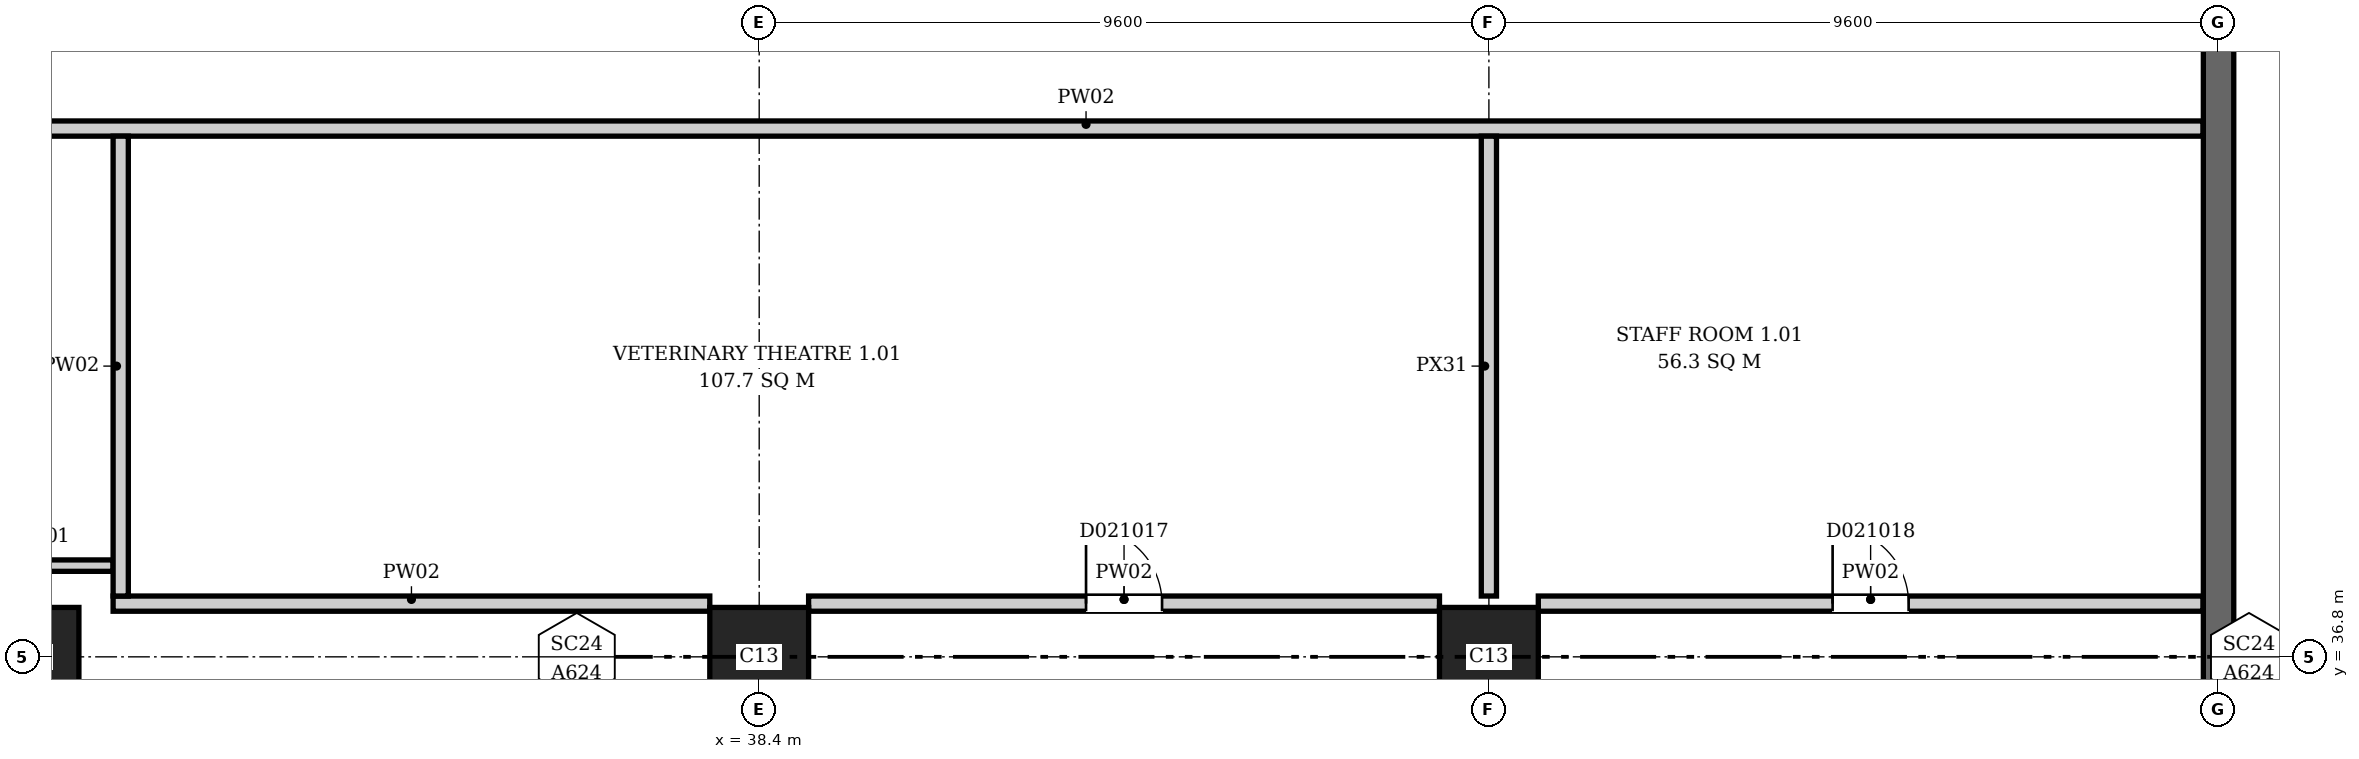
"""IFC4 building model, lengths in metres.
Left out: names, types, materials, properties, quantities, classifications, styles, units other than length and angle.
Written with IfcOpenShell. Run it as: python <this file> out.ifc"""

import sys

from ifc_helpers import new_model, si_unit, direction, frame, frame_2d, origin, origin_2d, place, context, subcontext, project, spatial, rectangle, extrude, element, fill, save


model = new_model("IFC4")
c1 = context("Model", 3, precision=1e-05, world=origin(), true_north=direction((0.0, 1.0)))
c2 = subcontext(c1, "Body", "Model", "MODEL_VIEW")
j1 = project(units=[si_unit("LENGTHUNIT", "METRE"), si_unit("PLANEANGLEUNIT", "RADIAN")], contexts=[c1])
p1 = place(None, origin())
s1 = spatial("IfcSite", under=j1, at=p1, CompositionType="ELEMENT")
p2 = place(p1, origin())
s2 = spatial("IfcBuilding", under=s1, at=p2, CompositionType="ELEMENT")
p3 = place(p2, frame((0.0, 0.0, 6.5)))
s3 = spatial("IfcBuildingStorey", under=s2, at=p3, CompositionType="ELEMENT", Elevation=6.5)
p4 = place(p3, frame((57.6, -0.2, 0.0), z_axis=(0.0, 0.0, 1.0), x_axis=(0.0, 1.0, 0.0)))
e1 = element("IfcWall", 1, at=p4, inside=s3, PredefinedType="SHEAR", context=c2, shape_type="SweptSolid", body=[
    extrude(rectangle(XDim=46.88, YDim=0.4, at=frame_2d((23.44, 0.0))), origin(), (0.0, 0.0, 1.0), 7.7),
])
for number, where, z_axis, x_axis in (
    (2, (28.8, 36.8, 0.0), (0.0, 0.0, 1.0), (1.0, 0.0, 0.0)),
    (3, (38.4, 36.8, 0.0), (0.0, 0.0, 1.0), (1.0, 0.0, 0.0)),
    (4, (48.0, 36.8, 0.0), (0.0, 0.0, 1.0), (1.0, 0.0, 0.0)),
):
    element("IfcColumn", number, at=place(p3, frame(where, z_axis=z_axis, x_axis=x_axis)), inside=s3, PredefinedType="COLUMN", context=c2, shape_type="SweptSolid", body=[
        extrude(rectangle(XDim=1.3, YDim=1.3, at=origin_2d()), origin(), (0.0, 0.0, 1.0), 7.7),
    ])
p5 = place(p3, frame((28.006, 38.0, 0.0), z_axis=(0.0, 0.0, 1.0), x_axis=(1.0, 0.0, 0.0)))
e5 = element("IfcWall", 5, at=p5, inside=s3, PredefinedType="PARTITIONING", context=c2, shape_type="SweptSolid", body=[
    extrude(rectangle(XDim=1.894, YDim=0.15, at=frame_2d((0.947, 0.0))), origin(), (0.0, 0.0, 1.0), 7.35),
])
p6 = place(p3, frame((28.006, 43.75, 0.0), z_axis=(0.0, 0.0, 1.0), x_axis=(1.0, 0.0, 0.0)))
e6 = element("IfcWall", 6, at=p6, inside=s3, PredefinedType="PARTITIONING", context=c2, shape_type="SweptSolid", body=[
    extrude(rectangle(XDim=29.388, YDim=0.2, at=frame_2d((14.694, 0.0))), origin(), (0.0, 0.0, 1.0), 7.35),
])
p7 = place(p3, frame((29.9, 37.5, 0.0), z_axis=(0.0, 0.0, 1.0), x_axis=(1.0, 0.0, 0.0)))
e7 = element("IfcWall", 7, at=p7, inside=s3, PredefinedType="PARTITIONING", context=c2, shape_type="SweptSolid", body=[
    extrude(rectangle(XDim=7.85, YDim=0.2, at=frame_2d((3.925, 0.0))), origin(), (0.0, 0.0, 1.0), 7.35),
])
p8 = place(p3, frame((30.0, 37.6, 0.0), z_axis=(0.0, 0.0, 1.0), x_axis=(0.0, 1.0, 0.0)))
e8 = element("IfcWall", 8, at=p8, inside=s3, PredefinedType="PARTITIONING", context=c2, shape_type="SweptSolid", body=[
    extrude(rectangle(XDim=6.05, YDim=0.2, at=frame_2d((3.025, 0.0))), origin(), (0.0, 0.0, 1.0), 7.35),
])
p9 = place(p3, frame((39.05, 37.5, 0.0), z_axis=(0.0, 0.0, 1.0), x_axis=(1.0, 0.0, 0.0)))
e9 = element("IfcWall", 9, at=p9, inside=s3, PredefinedType="PARTITIONING", context=c2, shape_type="SweptSolid", body=[
    extrude(rectangle(XDim=8.3, YDim=0.2, at=frame_2d((4.15, 0.0))), origin(), (0.0, 0.0, 1.0), 7.35),
])
p10 = place(p9, frame((3.65, 0.0, 0.0)))
e10 = element("IfcOpeningElement", 10, at=p10, cuts=e9, PredefinedType="OPENING", context=c2, shape_type="SweptSolid", body=[
    extrude(rectangle(XDim=1.0, YDim=2.1, at=frame_2d((0.5, 1.05))), frame((0.0, 0.11, 0.0), z_axis=(0.0, -1.0, 0.0), x_axis=(1.0, 0.0, 0.0)), (0.0, 0.0, 1.0), 0.22),
])
p11 = place(p3, frame((48.0, 37.6, 0.0), z_axis=(0.0, 0.0, 1.0), x_axis=(0.0, 1.0, 0.0)))
e11 = element("IfcWall", 11, at=p11, inside=s3, PredefinedType="PARTITIONING", context=c2, shape_type="SweptSolid", body=[
    extrude(rectangle(XDim=6.05, YDim=0.2, at=frame_2d((3.025, 0.0))), origin(), (0.0, 0.0, 1.0), 6.95),
])
p12 = place(p3, frame((48.65, 37.5, 0.0), z_axis=(0.0, 0.0, 1.0), x_axis=(1.0, 0.0, 0.0)))
e12 = element("IfcWall", 12, at=p12, inside=s3, PredefinedType="PARTITIONING", context=c2, shape_type="SweptSolid", body=[
    extrude(rectangle(XDim=8.744, YDim=0.2, at=frame_2d((4.372, 0.0))), origin(), (0.0, 0.0, 1.0), 7.35),
])
p13 = place(p12, frame((3.872, 0.0, 0.0)))
e13 = element("IfcOpeningElement", 13, at=p13, cuts=e12, PredefinedType="OPENING", context=c2, shape_type="SweptSolid", body=[
    extrude(rectangle(XDim=1.0, YDim=2.1, at=frame_2d((0.5, 1.05))), frame((0.0, 0.11, 0.0), z_axis=(0.0, -1.0, 0.0), x_axis=(1.0, 0.0, 0.0)), (0.0, 0.0, 1.0), 0.22),
])
p14 = place(p10, origin())
e14 = element("IfcDoor", 14, at=p14, inside=s3, OperationType="SINGLE_SWING_LEFT", PredefinedType="DOOR", context=c2, shape_type="SweptSolid", body=[
    extrude(rectangle(XDim=1.0, YDim=2.1, at=frame_2d((0.5, 1.05))), frame((0.0, 0.025, 0.0), z_axis=(0.0, -1.0, 0.0), x_axis=(1.0, 0.0, 0.0)), (0.0, 0.0, 1.0), 0.05),
])
fill(e10, e14)
p15 = place(p13, origin())
e15 = element("IfcDoor", 15, at=p15, inside=s3, OperationType="SINGLE_SWING_LEFT", PredefinedType="DOOR", context=c2, shape_type="SweptSolid", body=[
    extrude(rectangle(XDim=1.0, YDim=2.1, at=frame_2d((0.5, 1.05))), frame((0.0, 0.025, 0.0), z_axis=(0.0, -1.0, 0.0), x_axis=(1.0, 0.0, 0.0)), (0.0, 0.0, 1.0), 0.05),
])
fill(e13, e15)
save(model, sys.argv[1])
